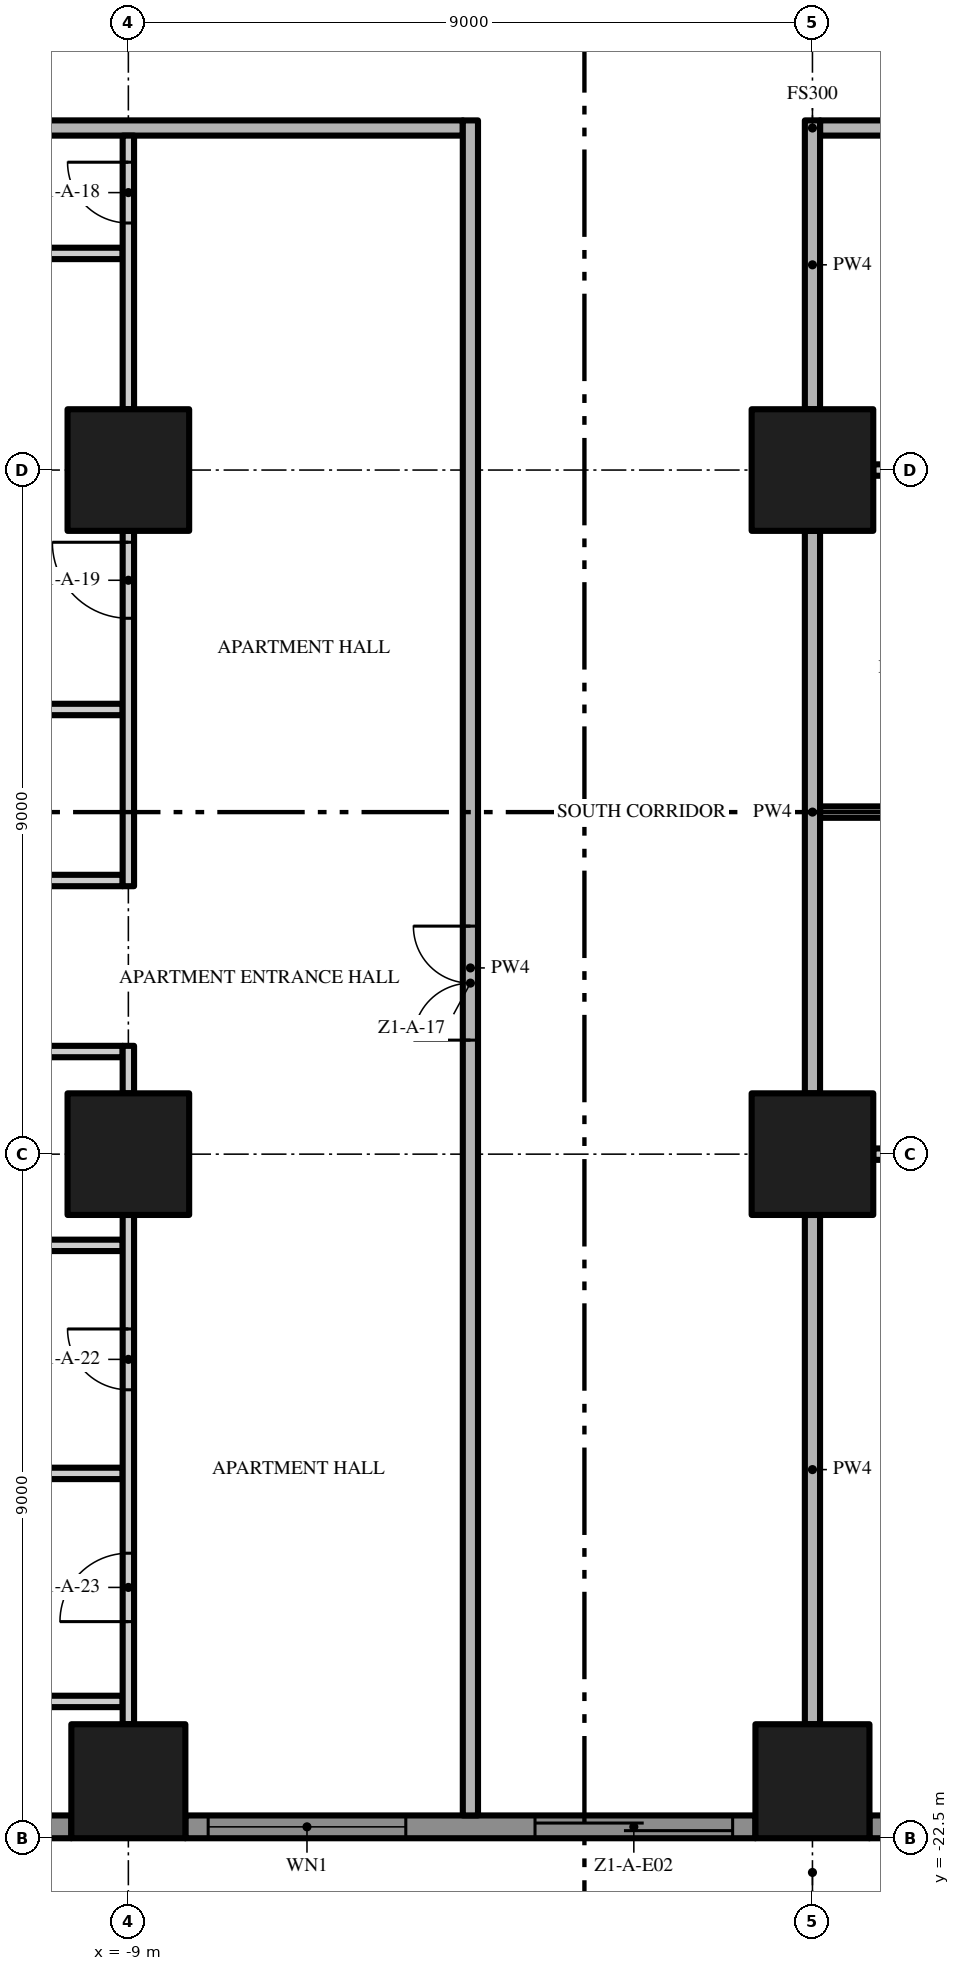
"""IFC4 building model, lengths in metres.
Left out: names, types, materials, properties, quantities, classifications, styles, units other than length and angle.
Written with IfcOpenShell. Run it as: python <this file> out.ifc"""

import sys

from ifc_helpers import new_model, si_unit, direction, frame, frame_2d, origin, origin_2d, place, context, subcontext, project, spatial, polyline, rectangle, outline, extrude, element, fill, save


model = new_model("IFC4")
c1 = context("Model", 3, precision=1e-05, world=origin(), true_north=direction((0.0, 1.0)))
c2 = subcontext(c1, "Body", "Model", "MODEL_VIEW")
j1 = project(units=[si_unit("LENGTHUNIT", "METRE"), si_unit("PLANEANGLEUNIT", "RADIAN")], contexts=[c1])
p1 = place(None, origin())
s1 = spatial("IfcSite", under=j1, at=p1, CompositionType="ELEMENT")
p2 = place(p1, origin())
s2 = spatial("IfcBuilding", under=s1, at=p2, CompositionType="ELEMENT")
p3 = place(p2, frame((0.0, 0.0, 15.0)))
s3 = spatial("IfcBuildingStorey", under=s2, at=p3, CompositionType="ELEMENT", Elevation=15.0)
p4 = place(p3, frame((-9.0, -13.5, 0.0), z_axis=(0.0, 0.0, 1.0), x_axis=(1.0, 0.0, 0.0)))
e1 = element("IfcColumn", 1, at=p4, inside=s3, PredefinedType="COLUMN", context=c2, shape_type="SweptSolid", body=[
    extrude(rectangle(XDim=1.6, YDim=1.6, at=origin_2d()), origin(), (0.0, 0.0, 1.0), 3.5),
])
p5 = place(p3, frame((-9.0, -21.75, 0.0), z_axis=(0.0, 0.0, 1.0), x_axis=(1.0, 0.0, 0.0)))
e2 = element("IfcColumn", 2, at=p5, inside=s3, PredefinedType="COLUMN", context=c2, shape_type="SweptSolid", body=[
    extrude(rectangle(XDim=1.5, YDim=1.5, at=origin_2d()), origin(), (0.0, 0.0, 1.0), 3.5),
])
for number, where, z_axis, x_axis in (
    (3, (-9.0, -4.5, 0.0), (0.0, 0.0, 1.0), (1.0, 0.0, 0.0)),
    (4, (0.0, -13.5, 0.0), (0.0, 0.0, 1.0), (1.0, 0.0, 0.0)),
):
    element("IfcColumn", number, at=place(p3, frame(where, z_axis=z_axis, x_axis=x_axis)), inside=s3, PredefinedType="COLUMN", context=c2, shape_type="SweptSolid", body=[
        extrude(rectangle(XDim=1.6, YDim=1.6, at=origin_2d()), origin(), (0.0, 0.0, 1.0), 3.5),
    ])
p6 = place(p3, frame((0.0, -21.75, 0.0), z_axis=(0.0, 0.0, 1.0), x_axis=(1.0, 0.0, 0.0)))
e5 = element("IfcColumn", 5, at=p6, inside=s3, PredefinedType="COLUMN", context=c2, shape_type="SweptSolid", body=[
    extrude(rectangle(XDim=1.5, YDim=1.5, at=origin_2d()), origin(), (0.0, 0.0, 1.0), 3.5),
])
p7 = place(p3, frame((0.0, -4.5, 0.0), z_axis=(0.0, 0.0, 1.0), x_axis=(1.0, 0.0, 0.0)))
e6 = element("IfcColumn", 6, at=p7, inside=s3, PredefinedType="COLUMN", context=c2, shape_type="SweptSolid", body=[
    extrude(rectangle(XDim=1.6, YDim=1.6, at=origin_2d()), origin(), (0.0, 0.0, 1.0), 3.5),
])
p8 = place(p3, frame((-9.75, -22.35, 0.0), z_axis=(0.0, 0.0, 1.0), x_axis=(-1.0, 0.0, 0.0)))
e7 = element("IfcWall", 7, at=p8, inside=s3, PredefinedType="SOLIDWALL", context=c2, shape_type="SweptSolid", body=[
    extrude(rectangle(XDim=7.5, YDim=0.3, at=frame_2d((3.75, 0.0))), origin(), (0.0, 0.0, 1.0), 3.5),
])
p9 = place(p8, frame((4.6, 0.0, 0.45)))
e8 = element("IfcOpeningElement", 8, at=p9, cuts=e7, PredefinedType="OPENING", context=c2, shape_type="SweptSolid", body=[
    extrude(rectangle(XDim=2.6, YDim=2.65, at=frame_2d((1.3, 1.325))), frame((0.0, 0.16, 0.0), z_axis=(0.0, -1.0, 0.0), x_axis=(1.0, 0.0, 0.0)), (0.0, 0.0, 1.0), 0.32),
])
p10 = place(p8, frame((0.3, 0.0, 0.45)))
e9 = element("IfcOpeningElement", 9, at=p10, cuts=e7, PredefinedType="OPENING", context=c2, shape_type="SweptSolid", body=[
    extrude(rectangle(XDim=2.6, YDim=2.65, at=frame_2d((1.3, 1.325))), frame((0.0, 0.16, 0.0), z_axis=(0.0, -1.0, 0.0), x_axis=(1.0, 0.0, 0.0)), (0.0, 0.0, 1.0), 0.32),
])
p11 = place(p3, frame((-0.75, -22.35, 0.0), z_axis=(0.0, 0.0, 1.0), x_axis=(-1.0, 0.0, 0.0)))
e10 = element("IfcWall", 10, at=p11, inside=s3, PredefinedType="SOLIDWALL", context=c2, shape_type="SweptSolid", body=[
    extrude(rectangle(XDim=7.5, YDim=0.3, at=frame_2d((3.75, 0.0))), origin(), (0.0, 0.0, 1.0), 3.5),
])
p12 = place(p11, frame((4.6, 0.0, 0.45)))
e11 = element("IfcOpeningElement", 11, at=p12, cuts=e10, PredefinedType="OPENING", context=c2, shape_type="SweptSolid", body=[
    extrude(rectangle(XDim=2.6, YDim=2.65, at=frame_2d((1.3, 1.325))), frame((0.0, 0.16, 0.0), z_axis=(0.0, -1.0, 0.0), x_axis=(1.0, 0.0, 0.0)), (0.0, 0.0, 1.0), 0.32),
])
p13 = place(p11, frame((0.3, 0.0, 0.0)))
e12 = element("IfcOpeningElement", 12, at=p13, cuts=e10, PredefinedType="OPENING", context=c2, shape_type="SweptSolid", body=[
    extrude(rectangle(XDim=2.6, YDim=2.4, at=frame_2d((1.3, 1.2))), frame((0.0, 0.16, 0.0), z_axis=(0.0, -1.0, 0.0), x_axis=(1.0, 0.0, 0.0)), (0.0, 0.0, 1.0), 0.32),
])
p14 = place(p3, frame((8.25, -22.35, 0.0), z_axis=(0.0, 0.0, 1.0), x_axis=(-1.0, 0.0, 0.0)))
e13 = element("IfcWall", 13, at=p14, inside=s3, PredefinedType="SOLIDWALL", context=c2, shape_type="SweptSolid", body=[
    extrude(rectangle(XDim=7.5, YDim=0.3, at=frame_2d((3.75, 0.0))), origin(), (0.0, 0.0, 1.0), 3.5),
])
p15 = place(p14, frame((4.6, 0.0, 0.45)))
e14 = element("IfcOpeningElement", 14, at=p15, cuts=e13, PredefinedType="OPENING", context=c2, shape_type="SweptSolid", body=[
    extrude(rectangle(XDim=2.6, YDim=2.65, at=frame_2d((1.3, 1.325))), frame((0.0, 0.16, 0.0), z_axis=(0.0, -1.0, 0.0), x_axis=(1.0, 0.0, 0.0)), (0.0, 0.0, 1.0), 0.32),
])
p16 = place(p14, frame((0.3, 0.0, 0.45)))
e15 = element("IfcOpeningElement", 15, at=p16, cuts=e13, PredefinedType="OPENING", context=c2, shape_type="SweptSolid", body=[
    extrude(rectangle(XDim=2.6, YDim=2.65, at=frame_2d((1.3, 1.325))), frame((0.0, 0.16, 0.0), z_axis=(0.0, -1.0, 0.0), x_axis=(1.0, 0.0, 0.0)), (0.0, 0.0, 1.0), 0.32),
])
p17 = place(p3, origin())
e16 = element("IfcWall", 16, at=p17, inside=s3, PredefinedType="USERDEFINED", context=c2, shape_type="SweptSolid", body=[
    extrude(outline(polyline([(-22.5, -24.3), (-21.0, -25.005), (-19.5, -25.441), (-18.75, -25.5), (-18.0, -25.441), (-16.5, -25.005), (-15.0, -24.3), (-13.5, -23.595), (-12.0, -23.159), (-11.25, -23.1), (-10.5, -23.159), (-9.0, -23.595), (-7.5, -24.3), (-6.0, -25.005), (-4.5, -25.441), (-3.75, -25.5), (-3.0, -25.441), (-1.5, -25.005), (0.0, -24.3), (1.5, -23.595), (3.0, -23.159), (3.75, -23.1), (4.5, -23.159), (6.0, -23.595), (7.5, -24.3), (9.0, -25.005), (10.5, -25.441), (11.25, -25.5), (12.0, -25.441), (13.5, -25.005), (15.0, -24.3), (16.5, -23.595), (18.0, -23.159), (18.75, -23.1), (19.5, -23.159), (21.0, -23.595), (22.5, -24.3), (22.606, -24.074), (21.089, -23.36), (19.545, -22.911), (18.75, -22.849), (17.955, -22.911), (16.411, -23.36), (14.894, -24.074), (13.411, -24.771), (11.955, -25.194), (11.25, -25.249), (10.545, -25.194), (9.089, -24.771), (7.606, -24.074), (6.089, -23.36), (4.545, -22.911), (3.75, -22.849), (2.955, -22.911), (1.411, -23.36), (-0.106, -24.074), (-1.589, -24.771), (-3.045, -25.194), (-3.75, -25.249), (-4.455, -25.194), (-5.911, -24.771), (-7.394, -24.074), (-8.911, -23.36), (-10.455, -22.911), (-11.25, -22.849), (-12.045, -22.911), (-13.589, -23.36), (-15.106, -24.074), (-16.589, -24.771), (-18.045, -25.194), (-18.75, -25.249), (-19.455, -25.194), (-20.911, -24.771), (-22.394, -24.074), (-22.5, -24.3)])), origin(), (0.0, 0.0, 1.0), 0.9),
])
for number, where, z_axis, x_axis in (
    (17, (-13.425, -20.7, 0.0), (0.0, 0.0, 1.0), (1.0, 0.0, 0.0)),
    (18, (-13.425, -17.7, 0.0), (0.0, 0.0, 1.0), (1.0, 0.0, 0.0)),
    (19, (-13.425, -14.7, 0.0), (0.0, 0.0, 1.0), (1.0, 0.0, 0.0)),
):
    element("IfcWall", number, at=place(p3, frame(where, z_axis=z_axis, x_axis=x_axis)), inside=s3, PredefinedType="PARTITIONING", context=c2, shape_type="SweptSolid", body=[
        extrude(rectangle(XDim=4.35, YDim=0.15, at=frame_2d((2.175, 0.0))), origin(), (0.0, 0.0, 1.0), 3.5),
    ])
p18 = place(p3, frame((8.2, -13.5, 0.0), z_axis=(0.0, 0.0, 1.0), x_axis=(-1.0, 0.0, 0.0)))
e20 = element("IfcWall", 20, at=p18, inside=s3, PredefinedType="PARTITIONING", context=c2, shape_type="SweptSolid", body=[
    extrude(rectangle(XDim=7.4, YDim=0.15, at=frame_2d((3.7, 0.0))), origin(), (0.0, 0.0, 1.0), 3.5),
])
p19 = place(p18, frame((6.25, 0.0, 0.0)))
e21 = element("IfcOpeningElement", 21, at=p19, cuts=e20, PredefinedType="OPENING", context=c2, shape_type="SweptSolid", body=[
    extrude(rectangle(XDim=1.0, YDim=2.4, at=frame_2d((0.5, 1.2))), frame((0.0, 0.085, 0.0), z_axis=(0.0, -1.0, 0.0), x_axis=(1.0, 0.0, 0.0)), (0.0, 0.0, 1.0), 0.17),
])
p20 = place(p18, frame((0.15, 0.0, 0.0)))
e22 = element("IfcOpeningElement", 22, at=p20, cuts=e20, PredefinedType="OPENING", context=c2, shape_type="SweptSolid", body=[
    extrude(rectangle(XDim=1.0, YDim=2.4, at=frame_2d((0.5, 1.2))), frame((0.0, 0.085, 0.0), z_axis=(0.0, -1.0, 0.0), x_axis=(1.0, 0.0, 0.0)), (0.0, 0.0, 1.0), 0.17),
])
p21 = place(p3, frame((-13.425, -12.15, 0.0), z_axis=(0.0, 0.0, 1.0), x_axis=(1.0, 0.0, 0.0)))
e23 = element("IfcWall", 23, at=p21, inside=s3, PredefinedType="PARTITIONING", context=c2, shape_type="SweptSolid", body=[
    extrude(rectangle(XDim=4.35, YDim=0.15, at=frame_2d((2.175, 0.0))), origin(), (0.0, 0.0, 1.0), 3.5),
])
p22 = place(p3, frame((-13.425, -9.9, 0.0), z_axis=(0.0, 0.0, 1.0), x_axis=(1.0, 0.0, 0.0)))
e24 = element("IfcWall", 24, at=p22, inside=s3, PredefinedType="PARTITIONING", context=c2, shape_type="SweptSolid", body=[
    extrude(rectangle(XDim=4.35, YDim=0.15, at=frame_2d((2.175, 0.0))), origin(), (0.0, 0.0, 1.0), 3.5),
])
p23 = place(p22, frame((1.75, 0.0, 0.0)))
e25 = element("IfcOpeningElement", 25, at=p23, cuts=e24, PredefinedType="OPENING", context=c2, shape_type="SweptSolid", body=[
    extrude(rectangle(XDim=0.9, YDim=2.1, at=frame_2d((0.45, 1.05))), frame((0.0, 0.085, 0.0), z_axis=(0.0, -1.0, 0.0), x_axis=(1.0, 0.0, 0.0)), (0.0, 0.0, 1.0), 0.17),
])
p24 = place(p3, frame((0.1, -9.0, 0.0), z_axis=(0.0, 0.0, 1.0), x_axis=(1.0, 0.0, 0.0)))
e26 = element("IfcWall", 26, at=p24, inside=s3, PredefinedType="PARTITIONING", context=c2, shape_type="SweptSolid", body=[
    extrude(rectangle(XDim=13.775, YDim=0.15, at=frame_2d((6.888, 0.0))), origin(), (0.0, 0.0, 1.0), 3.5),
])
p25 = place(p24, frame((8.1, 0.0, 0.0)))
e27 = element("IfcOpeningElement", 27, at=p25, cuts=e26, PredefinedType="OPENING", context=c2, shape_type="SweptSolid", body=[
    extrude(rectangle(XDim=1.0, YDim=2.4, at=frame_2d((0.5, 1.2))), frame((0.0, 0.085, 0.0), z_axis=(0.0, -1.0, 0.0), x_axis=(1.0, 0.0, 0.0)), (0.0, 0.0, 1.0), 0.17),
])
p26 = place(p3, frame((-13.425, -7.65, 0.0), z_axis=(0.0, 0.0, 1.0), x_axis=(1.0, 0.0, 0.0)))
e28 = element("IfcWall", 28, at=p26, inside=s3, PredefinedType="PARTITIONING", context=c2, shape_type="SweptSolid", body=[
    extrude(rectangle(XDim=4.35, YDim=0.15, at=frame_2d((2.175, 0.0))), origin(), (0.0, 0.0, 1.0), 3.5),
])
p27 = place(p3, frame((8.2, -4.5, 0.0), z_axis=(0.0, 0.0, 1.0), x_axis=(-1.0, 0.0, 0.0)))
e29 = element("IfcWall", 29, at=p27, inside=s3, PredefinedType="PARTITIONING", context=c2, shape_type="SweptSolid", body=[
    extrude(rectangle(XDim=7.4, YDim=0.15, at=frame_2d((3.7, 0.0))), origin(), (0.0, 0.0, 1.0), 3.5),
])
p28 = place(p27, frame((6.45, 0.0, 0.0)))
e30 = element("IfcOpeningElement", 30, at=p28, cuts=e29, PredefinedType="OPENING", context=c2, shape_type="SweptSolid", body=[
    extrude(rectangle(XDim=0.8, YDim=2.0, at=frame_2d((0.4, 1.0))), frame((0.0, 0.085, 0.0), z_axis=(0.0, -1.0, 0.0), x_axis=(1.0, 0.0, 0.0)), (0.0, 0.0, 1.0), 0.17),
])
p29 = place(p27, frame((3.6, 0.0, 0.0)))
e31 = element("IfcOpeningElement", 31, at=p29, cuts=e29, PredefinedType="OPENING", context=c2, shape_type="SweptSolid", body=[
    extrude(rectangle(XDim=0.8, YDim=2.0, at=frame_2d((0.4, 1.0))), frame((0.0, 0.085, 0.0), z_axis=(0.0, -1.0, 0.0), x_axis=(1.0, 0.0, 0.0)), (0.0, 0.0, 1.0), 0.17),
])
p30 = place(p3, frame((-13.425, -1.65, 0.0), z_axis=(0.0, 0.0, 1.0), x_axis=(1.0, 0.0, 0.0)))
e32 = element("IfcWall", 32, at=p30, inside=s3, PredefinedType="PARTITIONING", context=c2, shape_type="SweptSolid", body=[
    extrude(rectangle(XDim=4.35, YDim=0.15, at=frame_2d((2.175, 0.0))), origin(), (0.0, 0.0, 1.0), 3.5),
])
p31 = place(p3, frame((-17.4, 0.0, 0.0), z_axis=(0.0, 0.0, 1.0), x_axis=(1.0, 0.0, 0.0)))
e33 = element("IfcWall", 33, at=p31, inside=s3, PredefinedType="PARTITIONING", context=c2, shape_type="SweptSolid", body=[
    extrude(rectangle(XDim=12.8, YDim=0.2, at=frame_2d((6.4, 0.0))), origin(), (0.0, 0.0, 1.0), 3.5),
])
p32 = place(p3, frame((17.4, 0.0, 0.0), z_axis=(0.0, 0.0, 1.0), x_axis=(-1.0, 0.0, 0.0)))
e34 = element("IfcWall", 34, at=p32, inside=s3, PredefinedType="PARTITIONING", context=c2, shape_type="SweptSolid", body=[
    extrude(rectangle(XDim=17.3, YDim=0.2, at=frame_2d((8.65, 0.0))), origin(), (0.0, 0.0, 1.0), 3.5),
])
p33 = place(p32, frame((7.65, 0.0, 0.0)))
e35 = element("IfcOpeningElement", 35, at=p33, cuts=e34, PredefinedType="OPENING", context=c2, shape_type="SweptSolid", body=[
    extrude(rectangle(XDim=1.5, YDim=2.4, at=frame_2d((0.75, 1.2))), frame((0.0, 0.11, 0.0), z_axis=(0.0, -1.0, 0.0), x_axis=(1.0, 0.0, 0.0)), (0.0, 0.0, 1.0), 0.22),
])
p34 = place(p3, frame((-9.0, -21.0, 0.0), z_axis=(0.0, 0.0, 1.0), x_axis=(0.0, 1.0, 0.0)))
e36 = element("IfcWall", 36, at=p34, inside=s3, PredefinedType="PARTITIONING", context=c2, shape_type="SweptSolid", body=[
    extrude(rectangle(XDim=6.7, YDim=0.15, at=frame_2d((3.35, 0.0))), origin(), (0.0, 0.0, 1.0), 3.5),
])
p35 = place(p34, frame((4.4, 0.0, 0.0)))
e37 = element("IfcOpeningElement", 37, at=p35, cuts=e36, PredefinedType="OPENING", context=c2, shape_type="SweptSolid", body=[
    extrude(rectangle(XDim=0.8, YDim=2.0, at=frame_2d((0.4, 1.0))), frame((0.0, 0.085, 0.0), z_axis=(0.0, -1.0, 0.0), x_axis=(1.0, 0.0, 0.0)), (0.0, 0.0, 1.0), 0.17),
])
p36 = place(p34, frame((1.35, 0.0, 0.0)))
e38 = element("IfcOpeningElement", 38, at=p36, cuts=e36, PredefinedType="OPENING", context=c2, shape_type="SweptSolid", body=[
    extrude(rectangle(XDim=0.9, YDim=2.1, at=frame_2d((0.45, 1.05))), frame((0.0, 0.085, 0.0), z_axis=(0.0, -1.0, 0.0), x_axis=(1.0, 0.0, 0.0)), (0.0, 0.0, 1.0), 0.17),
])
p37 = place(p3, frame((-9.0, -12.7, 0.0), z_axis=(0.0, 0.0, 1.0), x_axis=(0.0, 1.0, 0.0)))
e39 = element("IfcWall", 39, at=p37, inside=s3, PredefinedType="PARTITIONING", context=c2, shape_type="SweptSolid", body=[
    extrude(rectangle(XDim=0.625, YDim=0.15, at=frame_2d((0.312, 0.0))), origin(), (0.0, 0.0, 1.0), 3.5),
])
p38 = place(p3, frame((-9.0, -9.975, 0.0), z_axis=(0.0, 0.0, 1.0), x_axis=(0.0, 1.0, 0.0)))
e40 = element("IfcWall", 40, at=p38, inside=s3, PredefinedType="PARTITIONING", context=c2, shape_type="SweptSolid", body=[
    extrude(rectangle(XDim=4.675, YDim=0.15, at=frame_2d((2.337, 0.0))), origin(), (0.0, 0.0, 1.0), 3.5),
])
p39 = place(p38, frame((3.525, 0.0, 0.0)))
e41 = element("IfcOpeningElement", 41, at=p39, cuts=e40, PredefinedType="OPENING", context=c2, shape_type="SweptSolid", body=[
    extrude(rectangle(XDim=1.0, YDim=2.4, at=frame_2d((0.5, 1.2))), frame((0.0, 0.085, 0.0), z_axis=(0.0, -1.0, 0.0), x_axis=(1.0, 0.0, 0.0)), (0.0, 0.0, 1.0), 0.17),
])
p40 = place(p3, frame((-9.0, -3.7, 0.0), z_axis=(0.0, 0.0, 1.0), x_axis=(0.0, 1.0, 0.0)))
e42 = element("IfcWall", 42, at=p40, inside=s3, PredefinedType="PARTITIONING", context=c2, shape_type="SweptSolid", body=[
    extrude(rectangle(XDim=3.6, YDim=0.15, at=frame_2d((1.8, 0.0))), origin(), (0.0, 0.0, 1.0), 3.5),
])
p41 = place(p40, frame((2.45, 0.0, 0.0)))
e43 = element("IfcOpeningElement", 43, at=p41, cuts=e42, PredefinedType="OPENING", context=c2, shape_type="SweptSolid", body=[
    extrude(rectangle(XDim=0.8, YDim=2.0, at=frame_2d((0.4, 1.0))), frame((0.0, 0.085, 0.0), z_axis=(0.0, -1.0, 0.0), x_axis=(1.0, 0.0, 0.0)), (0.0, 0.0, 1.0), 0.17),
])
p42 = place(p3, frame((-4.5, -22.2, 0.0), z_axis=(0.0, 0.0, 1.0), x_axis=(0.0, 1.0, 0.0)))
e44 = element("IfcWall", 44, at=p42, inside=s3, PredefinedType="PARTITIONING", context=c2, shape_type="SweptSolid", body=[
    extrude(rectangle(XDim=22.3, YDim=0.2, at=frame_2d((11.15, 0.0))), origin(), (0.0, 0.0, 1.0), 3.5),
])
p43 = place(p42, frame((10.2, 0.0, 0.0)))
e45 = element("IfcOpeningElement", 45, at=p43, cuts=e44, PredefinedType="OPENING", context=c2, shape_type="SweptSolid", body=[
    extrude(rectangle(XDim=1.5, YDim=2.4, at=frame_2d((0.75, 1.2))), frame((0.0, 0.11, 0.0), z_axis=(0.0, -1.0, 0.0), x_axis=(1.0, 0.0, 0.0)), (0.0, 0.0, 1.0), 0.22),
])
p44 = place(p3, frame((0.0, -21.0, 0.0), z_axis=(0.0, 0.0, 1.0), x_axis=(0.0, 1.0, 0.0)))
e46 = element("IfcWall", 46, at=p44, inside=s3, PredefinedType="PARTITIONING", context=c2, shape_type="SweptSolid", body=[
    extrude(rectangle(XDim=6.7, YDim=0.2, at=frame_2d((3.35, 0.0))), origin(), (0.0, 0.0, 1.0), 3.5),
])
p45 = place(p3, frame((0.0, -12.7, 0.0), z_axis=(0.0, 0.0, 1.0), x_axis=(0.0, 1.0, 0.0)))
e47 = element("IfcWall", 47, at=p45, inside=s3, PredefinedType="PARTITIONING", context=c2, shape_type="SweptSolid", body=[
    extrude(rectangle(XDim=7.4, YDim=0.2, at=frame_2d((3.7, 0.0))), origin(), (0.0, 0.0, 1.0), 3.5),
])
p46 = place(p3, frame((0.0, -3.7, 0.0), z_axis=(0.0, 0.0, 1.0), x_axis=(0.0, 1.0, 0.0)))
e48 = element("IfcWall", 48, at=p46, inside=s3, PredefinedType="PARTITIONING", context=c2, shape_type="SweptSolid", body=[
    extrude(rectangle(XDim=3.8, YDim=0.2, at=frame_2d((1.9, 0.0))), origin(), (0.0, 0.0, 1.0), 3.5),
])
p47 = place(p12, origin())
e49 = element("IfcWindow", 49, at=p47, inside=s3, PartitioningType="SINGLE_PANEL", PredefinedType="WINDOW", context=c2, shape_type="SweptSolid", body=[
    extrude(rectangle(XDim=2.6, YDim=2.65, at=frame_2d((1.3, 1.325))), frame((0.0, 0.03, 0.0), z_axis=(0.0, -1.0, 0.0), x_axis=(1.0, 0.0, 0.0)), (0.0, 0.0, 1.0), 0.06),
])
fill(e11, e49)
p48 = place(p13, origin())
e50 = element("IfcDoor", 50, at=p48, inside=s3, OperationType="SINGLE_SWING_LEFT", PredefinedType="DOOR", context=c2, shape_type="SweptSolid", body=[
    extrude(rectangle(XDim=2.6, YDim=2.4, at=frame_2d((1.3, 1.2))), frame((0.0, 0.025, 0.0), z_axis=(0.0, -1.0, 0.0), x_axis=(1.0, 0.0, 0.0)), (0.0, 0.0, 1.0), 0.05),
])
fill(e12, e50)
p49 = place(p43, origin())
e51 = element("IfcDoor", 51, at=p49, inside=s3, OperationType="DOUBLE_DOOR_SINGLE_SWING", PredefinedType="DOOR", context=c2, shape_type="SweptSolid", body=[
    extrude(rectangle(XDim=1.5, YDim=2.4, at=frame_2d((0.75, 1.2))), frame((0.0, 0.025, 0.0), z_axis=(0.0, -1.0, 0.0), x_axis=(1.0, 0.0, 0.0)), (0.0, 0.0, 1.0), 0.05),
])
fill(e45, e51)
p50 = place(p41, origin())
e52 = element("IfcDoor", 52, at=p50, inside=s3, OperationType="SINGLE_SWING_RIGHT", PredefinedType="DOOR", context=c2, shape_type="SweptSolid", body=[
    extrude(rectangle(XDim=0.8, YDim=2.0, at=frame_2d((0.4, 1.0))), frame((0.0, 0.025, 0.0), z_axis=(0.0, -1.0, 0.0), x_axis=(1.0, 0.0, 0.0)), (0.0, 0.0, 1.0), 0.05),
])
fill(e43, e52)
p51 = place(p39, origin())
e53 = element("IfcDoor", 53, at=p51, inside=s3, OperationType="SINGLE_SWING_RIGHT", PredefinedType="DOOR", context=c2, shape_type="SweptSolid", body=[
    extrude(rectangle(XDim=1.0, YDim=2.4, at=frame_2d((0.5, 1.2))), frame((0.0, 0.025, 0.0), z_axis=(0.0, -1.0, 0.0), x_axis=(1.0, 0.0, 0.0)), (0.0, 0.0, 1.0), 0.05),
])
fill(e41, e53)
p52 = place(p35, origin())
e54 = element("IfcDoor", 54, at=p52, inside=s3, OperationType="SINGLE_SWING_RIGHT", PredefinedType="DOOR", context=c2, shape_type="SweptSolid", body=[
    extrude(rectangle(XDim=0.8, YDim=2.0, at=frame_2d((0.4, 1.0))), frame((0.0, 0.025, 0.0), z_axis=(0.0, -1.0, 0.0), x_axis=(1.0, 0.0, 0.0)), (0.0, 0.0, 1.0), 0.05),
])
fill(e37, e54)
p53 = place(p36, origin())
e55 = element("IfcDoor", 55, at=p53, inside=s3, OperationType="SINGLE_SWING_LEFT", PredefinedType="DOOR", context=c2, shape_type="SweptSolid", body=[
    extrude(rectangle(XDim=0.9, YDim=2.1, at=frame_2d((0.45, 1.05))), frame((0.0, 0.025, 0.0), z_axis=(0.0, -1.0, 0.0), x_axis=(1.0, 0.0, 0.0)), (0.0, 0.0, 1.0), 0.05),
])
fill(e38, e55)
save(model, sys.argv[1])
